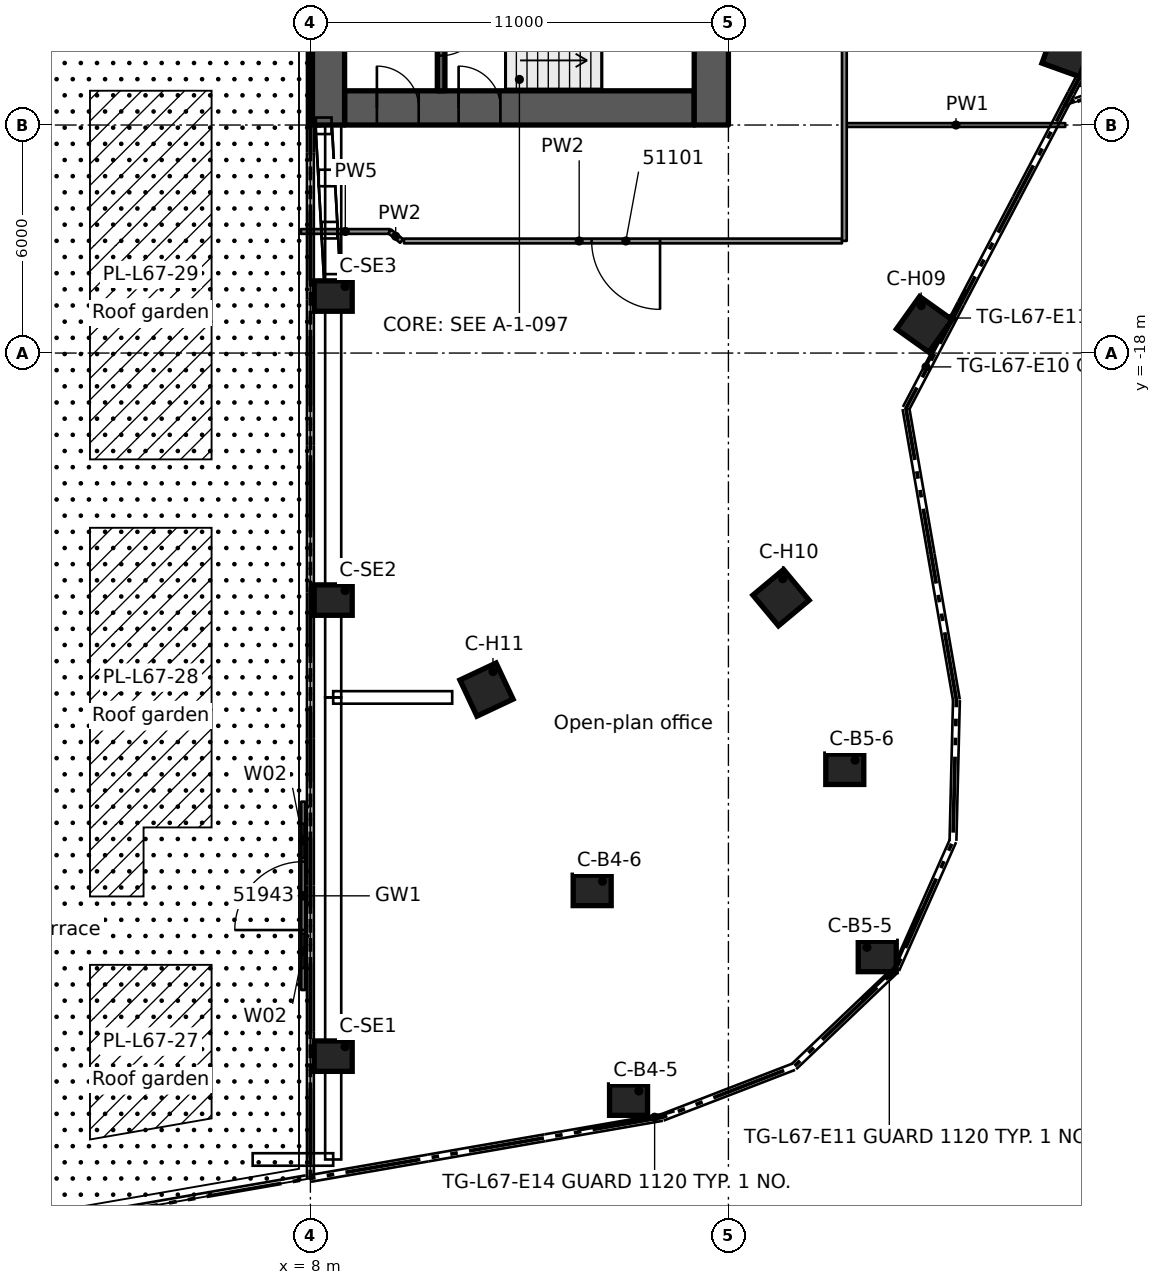
"""IFC4 building model, lengths in metres.
Left out: names, types, materials, properties, quantities, classifications, styles, units other than length and angle.
Written with IfcOpenShell. Run it as: python <this file> out.ifc"""

import sys

from ifc_helpers import new_model, si_unit, direction, frame, frame_2d, origin, origin_2d, place, context, subcontext, project, spatial, rectangle, extrude, element, fill, save


model = new_model("IFC4")
c1 = context("Model", 3, precision=1e-05, world=origin(), true_north=direction((0.0, 1.0)))
c2 = subcontext(c1, "Body", "Model", "MODEL_VIEW")
j1 = project(units=[si_unit("LENGTHUNIT", "METRE"), si_unit("PLANEANGLEUNIT", "RADIAN")], contexts=[c1])
p1 = place(None, origin())
s1 = spatial("IfcSite", under=j1, at=p1, CompositionType="ELEMENT")
p2 = place(p1, origin())
s2 = spatial("IfcBuilding", under=s1, at=p2, CompositionType="ELEMENT")
p3 = place(p2, frame((0.0, 0.0, 253.5)))
s3 = spatial("IfcBuildingStorey", under=s2, at=p3, CompositionType="ELEMENT", Elevation=253.5)
p4 = place(p3, frame((8.9, -11.55, 0.0), z_axis=(0.0, 0.0, 1.0), x_axis=(1.0, 0.0, 0.0)))
e1 = element("IfcWall", 1, at=p4, inside=s3, PredefinedType="SHEAR", context=c2, shape_type="SweptSolid", body=[
    extrude(rectangle(XDim=9.2, YDim=0.9, at=frame_2d((4.6, 0.0))), origin(), (0.0, 0.0, 1.0), 3.5),
])
p5 = place(p4, frame((0.85, 0.0, 0.0)))
e2 = element("IfcOpeningElement", 2, at=p5, cuts=e1, PredefinedType="OPENING", context=c2, shape_type="SweptSolid", body=[
    extrude(rectangle(XDim=1.1, YDim=2.1, at=frame_2d((0.55, 1.05))), frame((0.0, 0.46, 0.0), z_axis=(0.0, -1.0, 0.0), x_axis=(1.0, 0.0, 0.0)), (0.0, 0.0, 1.0), 0.92),
])
p6 = place(p4, frame((3.0, 0.0, 0.0)))
e3 = element("IfcOpeningElement", 3, at=p6, cuts=e1, PredefinedType="OPENING", context=c2, shape_type="SweptSolid", body=[
    extrude(rectangle(XDim=1.1, YDim=2.1, at=frame_2d((0.55, 1.05))), frame((0.0, 0.46, 0.0), z_axis=(0.0, -1.0, 0.0), x_axis=(1.0, 0.0, 0.0)), (0.0, 0.0, 1.0), 0.92),
])
p7 = place(p3, frame((8.45, -12.0, 0.0), z_axis=(0.0, 0.0, 1.0), x_axis=(0.0, 1.0, 0.0)))
e4 = element("IfcWall", 4, at=p7, inside=s3, PredefinedType="SHEAR", context=c2, shape_type="SweptSolid", body=[
    extrude(rectangle(XDim=24.0, YDim=0.9, at=frame_2d((12.0, 0.0))), origin(), (0.0, 0.0, 1.0), 3.5),
])
p8 = place(p3, frame((18.55, -12.0, 0.0), z_axis=(0.0, 0.0, 1.0), x_axis=(0.0, 1.0, 0.0)))
e5 = element("IfcWall", 5, at=p8, inside=s3, PredefinedType="SHEAR", context=c2, shape_type="SweptSolid", body=[
    extrude(rectangle(XDim=24.0, YDim=0.9, at=frame_2d((12.0, 0.0))), origin(), (0.0, 0.0, 1.0), 3.5),
])
p9 = place(p8, frame((12.1, 0.0, 0.0)))
e6 = element("IfcOpeningElement", 6, at=p9, cuts=e5, PredefinedType="OPENING", context=c2, shape_type="SweptSolid", body=[
    extrude(rectangle(XDim=1.8, YDim=2.1, at=frame_2d((0.9, 1.05))), frame((0.0, 0.46, 0.0), z_axis=(0.0, -1.0, 0.0), x_axis=(1.0, 0.0, 0.0)), (0.0, 0.0, 1.0), 0.92),
])
for number, where, z_axis, x_axis in (
    (7, (16.372, -37.657, 0.0), (0.0, 0.0, 1.0), (1.0, 0.0, 0.0)),
    (8, (15.415, -32.139, 0.0), (0.0, 0.0, 1.0), (1.0, 0.0, 0.0)),
    (9, (22.916, -33.877, 0.0), (0.0, 0.0, 1.0), (1.0, 0.0, 0.0)),
    (10, (22.062, -28.951, 0.0), (0.0, 0.0, 1.0), (1.0, 0.0, 0.0)),
):
    element("IfcColumn", number, at=place(p3, frame(where, z_axis=z_axis, x_axis=x_axis)), inside=s3, PredefinedType="COLUMN", context=c2, shape_type="SweptSolid", body=[
        extrude(rectangle(XDim=1.0, YDim=0.8, at=origin_2d()), origin(), (0.0, 0.0, 1.0), 3.5),
    ])
for number, where, z_axis, x_axis in (
    (11, (27.923, -10.056, 0.0), (0.0, 0.0, 1.0), (0.941, -0.339, 0.0)),
    (12, (24.154, -17.246, 0.0), (0.0, 0.0, 1.0), (0.814, -0.581, 0.0)),
    (13, (20.384, -24.437, 0.0), (0.0, 0.0, 1.0), (0.641, -0.768, 0.0)),
    (14, (12.634, -26.855, 0.0), (0.0, 0.0, 1.0), (0.426, -0.905, 0.0)),
):
    element("IfcColumn", number, at=place(p3, frame(where, z_axis=z_axis, x_axis=x_axis)), inside=s3, PredefinedType="COLUMN", context=c2, shape_type="SweptSolid", body=[
        extrude(rectangle(XDim=1.05, YDim=1.05, at=origin_2d()), origin(), (0.0, 0.0, 1.0), 3.5),
    ])
for number, where, z_axis, x_axis in (
    (15, (8.6, -36.5, 0.0), (0.0, 0.0, 1.0), (1.0, 0.0, 0.0)),
    (16, (8.6, -24.5, 0.0), (0.0, 0.0, 1.0), (1.0, 0.0, 0.0)),
    (17, (8.6, -16.5, 0.0), (0.0, 0.0, 1.0), (1.0, 0.0, 0.0)),
):
    element("IfcColumn", number, at=place(p3, frame(where, z_axis=z_axis, x_axis=x_axis)), inside=s3, PredefinedType="COLUMN", context=c2, shape_type="SweptSolid", body=[
        extrude(rectangle(XDim=1.0, YDim=0.8, at=origin_2d()), origin(), (0.0, 0.0, 1.0), 3.5),
    ])
p10 = place(p3, frame((11.44, -6.975, 0.0), z_axis=(0.0, 0.0, 1.0), x_axis=(0.0, -1.0, 0.0)))
e18 = element("IfcWall", 18, at=p10, inside=s3, PredefinedType="SOLIDWALL", context=c2, shape_type="SweptSolid", body=[
    extrude(rectangle(XDim=4.125, YDim=0.2, at=frame_2d((2.062, 0.0))), origin(), (0.0, 0.0, 1.0), 3.09),
])
p11 = place(p10, frame((2.1, 0.0, 0.0)))
e19 = element("IfcOpeningElement", 19, at=p11, cuts=e18, PredefinedType="OPENING", context=c2, shape_type="SweptSolid", body=[
    extrude(rectangle(XDim=1.1, YDim=2.1, at=frame_2d((0.55, 1.05))), frame((0.0, 0.11, 0.0), z_axis=(0.0, -1.0, 0.0), x_axis=(1.0, 0.0, 0.0)), (0.0, 0.0, 1.0), 0.22),
])
p12 = place(p3, frame((7.81, -34.76, 0.0), z_axis=(0.0, 0.0, 1.0), x_axis=(0.0, 1.0, 0.0)))
e20 = element("IfcWall", 20, at=p12, inside=s3, PredefinedType="STANDARD", context=c2, shape_type="SweptSolid", body=[
    extrude(rectangle(XDim=4.957, YDim=0.1, at=frame_2d((2.479, 0.0))), origin(), (0.0, 0.0, 1.0), 3.1),
])
p13 = place(p12, frame((1.578, 0.0, 0.0)))
e21 = element("IfcOpeningElement", 21, at=p13, cuts=e20, PredefinedType="OPENING", context=c2, shape_type="SweptSolid", body=[
    extrude(rectangle(XDim=1.8, YDim=2.4, at=frame_2d((0.9, 1.2))), frame((0.0, 0.06, 0.0), z_axis=(0.0, -1.0, 0.0), x_axis=(1.0, 0.0, 0.0)), (0.0, 0.0, 1.0), 0.12),
])
p14 = place(p12, frame((0.578, 0.0, 0.0)))
e22 = element("IfcOpeningElement", 22, at=p14, cuts=e20, PredefinedType="OPENING", context=c2, shape_type="SweptSolid", body=[
    extrude(rectangle(XDim=0.9, YDim=2.4, at=frame_2d((0.45, 1.2))), frame((0.0, 0.06, 0.0), z_axis=(0.0, -1.0, 0.0), x_axis=(1.0, 0.0, 0.0)), (0.0, 0.0, 1.0), 0.12),
])
p15 = place(p12, frame((3.479, 0.0, 0.0)))
e23 = element("IfcOpeningElement", 23, at=p15, cuts=e20, PredefinedType="OPENING", context=c2, shape_type="SweptSolid", body=[
    extrude(rectangle(XDim=0.9, YDim=2.4, at=frame_2d((0.45, 1.2))), frame((0.0, 0.06, 0.0), z_axis=(0.0, -1.0, 0.0), x_axis=(1.0, 0.0, 0.0)), (0.0, 0.0, 1.0), 0.12),
])
p16 = place(p3, frame((21.988, -15.051, 0.0), z_axis=(0.0, 0.0, 1.0), x_axis=(-1.0, 0.0, 0.0)))
e24 = element("IfcWall", 24, at=p16, inside=s3, PredefinedType="PARTITIONING", context=c2, shape_type="SweptSolid", body=[
    extrude(rectangle(XDim=11.525, YDim=0.125, at=frame_2d((5.763, 0.0))), origin(), (0.0, 0.0, 1.0), 3.08),
])
p17 = place(p16, frame((4.788, 0.0, 0.0)))
e25 = element("IfcOpeningElement", 25, at=p17, cuts=e24, PredefinedType="OPENING", context=c2, shape_type="SweptSolid", body=[
    extrude(rectangle(XDim=1.8, YDim=2.1, at=frame_2d((0.9, 1.05))), frame((0.0, 0.073, 0.0), z_axis=(0.0, -1.0, 0.0), x_axis=(1.0, 0.0, 0.0)), (0.0, 0.0, 1.0), 0.145),
])
p18 = place(p3, frame((7.75, -14.801, 0.0), z_axis=(0.0, 0.0, 1.0), x_axis=(1.0, 0.0, 0.0)))
e26 = element("IfcWall", 26, at=p18, inside=s3, PredefinedType="PARTITIONING", context=c2, shape_type="SweptSolid", body=[
    extrude(rectangle(XDim=2.338, YDim=0.125, at=frame_2d((1.169, 0.0))), origin(), (0.0, 0.0, 1.0), 2.496),
])
p19 = place(p3, frame((22.113, -12.0, 0.0), z_axis=(0.0, 0.0, 1.0), x_axis=(1.0, 0.0, 0.0)))
e27 = element("IfcWall", 27, at=p19, inside=s3, PredefinedType="PARTITIONING", context=c2, shape_type="SweptSolid", body=[
    extrude(rectangle(XDim=5.751, YDim=0.1, at=frame_2d((2.875, 0.0))), origin(), (0.0, 0.0, 1.0), 3.08),
])
p20 = place(p3, frame((22.051, 15.05, 0.0), z_axis=(0.0, 0.0, 1.0), x_axis=(0.0, -1.0, 0.0)))
e28 = element("IfcWall", 28, at=p20, inside=s3, PredefinedType="PARTITIONING", context=c2, shape_type="SweptSolid", body=[
    extrude(rectangle(XDim=30.099, YDim=0.125, at=frame_2d((15.05, 0.0))), origin(), (0.0, 0.0, 1.0), 3.08),
])
p21 = place(p20, frame((20.65, 0.0, 0.0)))
e29 = element("IfcOpeningElement", 29, at=p21, cuts=e28, PredefinedType="OPENING", context=c2, shape_type="SweptSolid", body=[
    extrude(rectangle(XDim=0.9, YDim=2.1, at=frame_2d((0.45, 1.05))), frame((0.0, 0.073, 0.0), z_axis=(0.0, -1.0, 0.0), x_axis=(1.0, 0.0, 0.0)), (0.0, 0.0, 1.0), 0.145),
])
p22 = place(p20, frame((8.65, 0.0, 0.0)))
e30 = element("IfcOpeningElement", 30, at=p22, cuts=e28, PredefinedType="OPENING", context=c2, shape_type="SweptSolid", body=[
    extrude(rectangle(XDim=0.9, YDim=2.1, at=frame_2d((0.45, 1.05))), frame((0.0, 0.073, 0.0), z_axis=(0.0, -1.0, 0.0), x_axis=(1.0, 0.0, 0.0)), (0.0, 0.0, 1.0), 0.145),
])
p23 = place(p3, frame((10.4, -15.051, 0.0), z_axis=(0.0, 0.0, 1.0), x_axis=(-0.78039198874, 0.625290607566, 0.0)))
e31 = element("IfcWall", 31, at=p23, inside=s3, PredefinedType="PARTITIONING", context=c2, shape_type="SweptSolid", body=[
    extrude(rectangle(XDim=0.4, YDim=0.125, at=frame_2d((0.2, 0.0))), origin(), (0.0, 0.0, 1.0), 3.08),
])
p24 = place(p5, origin())
e32 = element("IfcDoor", 32, at=p24, inside=s3, OperationType="SINGLE_SWING_LEFT", PredefinedType="DOOR", context=c2, shape_type="SweptSolid", body=[
    extrude(rectangle(XDim=1.1, YDim=2.1, at=frame_2d((0.55, 1.05))), frame((0.0, 0.025, 0.0), z_axis=(0.0, -1.0, 0.0), x_axis=(1.0, 0.0, 0.0)), (0.0, 0.0, 1.0), 0.05),
])
fill(e2, e32)
p25 = place(p6, origin())
e33 = element("IfcDoor", 33, at=p25, inside=s3, OperationType="SINGLE_SWING_LEFT", PredefinedType="DOOR", context=c2, shape_type="SweptSolid", body=[
    extrude(rectangle(XDim=1.1, YDim=2.1, at=frame_2d((0.55, 1.05))), frame((0.0, 0.025, 0.0), z_axis=(0.0, -1.0, 0.0), x_axis=(1.0, 0.0, 0.0)), (0.0, 0.0, 1.0), 0.05),
])
fill(e3, e33)
p26 = place(p11, origin())
e34 = element("IfcDoor", 34, at=p26, inside=s3, OperationType="SINGLE_SWING_RIGHT", PredefinedType="DOOR", context=c2, shape_type="SweptSolid", body=[
    extrude(rectangle(XDim=1.1, YDim=2.1, at=frame_2d((0.55, 1.05))), frame((0.0, 0.025, 0.0), z_axis=(0.0, -1.0, 0.0), x_axis=(1.0, 0.0, 0.0)), (0.0, 0.0, 1.0), 0.05),
])
fill(e19, e34)
p27 = place(p13, origin())
e35 = element("IfcDoor", 35, at=p27, inside=s3, OperationType="DOUBLE_DOOR_SINGLE_SWING", PredefinedType="DOOR", context=c2, shape_type="SweptSolid", body=[
    extrude(rectangle(XDim=1.8, YDim=2.4, at=frame_2d((0.9, 1.2))), frame((0.0, 0.025, 0.0), z_axis=(0.0, -1.0, 0.0), x_axis=(1.0, 0.0, 0.0)), (0.0, 0.0, 1.0), 0.05),
])
fill(e21, e35)
p28 = place(p14, origin())
e36 = element("IfcWindow", 36, at=p28, inside=s3, PartitioningType="SINGLE_PANEL", PredefinedType="WINDOW", context=c2, shape_type="SweptSolid", body=[
    extrude(rectangle(XDim=0.9, YDim=2.4, at=frame_2d((0.45, 1.2))), frame((0.0, 0.03, 0.0), z_axis=(0.0, -1.0, 0.0), x_axis=(1.0, 0.0, 0.0)), (0.0, 0.0, 1.0), 0.06),
])
fill(e22, e36)
p29 = place(p15, origin())
e37 = element("IfcWindow", 37, at=p29, inside=s3, PartitioningType="SINGLE_PANEL", PredefinedType="WINDOW", context=c2, shape_type="SweptSolid", body=[
    extrude(rectangle(XDim=0.9, YDim=2.4, at=frame_2d((0.45, 1.2))), frame((0.0, 0.03, 0.0), z_axis=(0.0, -1.0, 0.0), x_axis=(1.0, 0.0, 0.0)), (0.0, 0.0, 1.0), 0.06),
])
fill(e23, e37)
p30 = place(p17, origin())
e38 = element("IfcDoor", 38, at=p30, inside=s3, OperationType="DOUBLE_DOOR_SINGLE_SWING", PredefinedType="DOOR", context=c2, shape_type="SweptSolid", body=[
    extrude(rectangle(XDim=1.8, YDim=2.1, at=frame_2d((0.9, 1.05))), frame((0.0, 0.025, 0.0), z_axis=(0.0, -1.0, 0.0), x_axis=(1.0, 0.0, 0.0)), (0.0, 0.0, 1.0), 0.05),
])
fill(e25, e38)
save(model, sys.argv[1])
